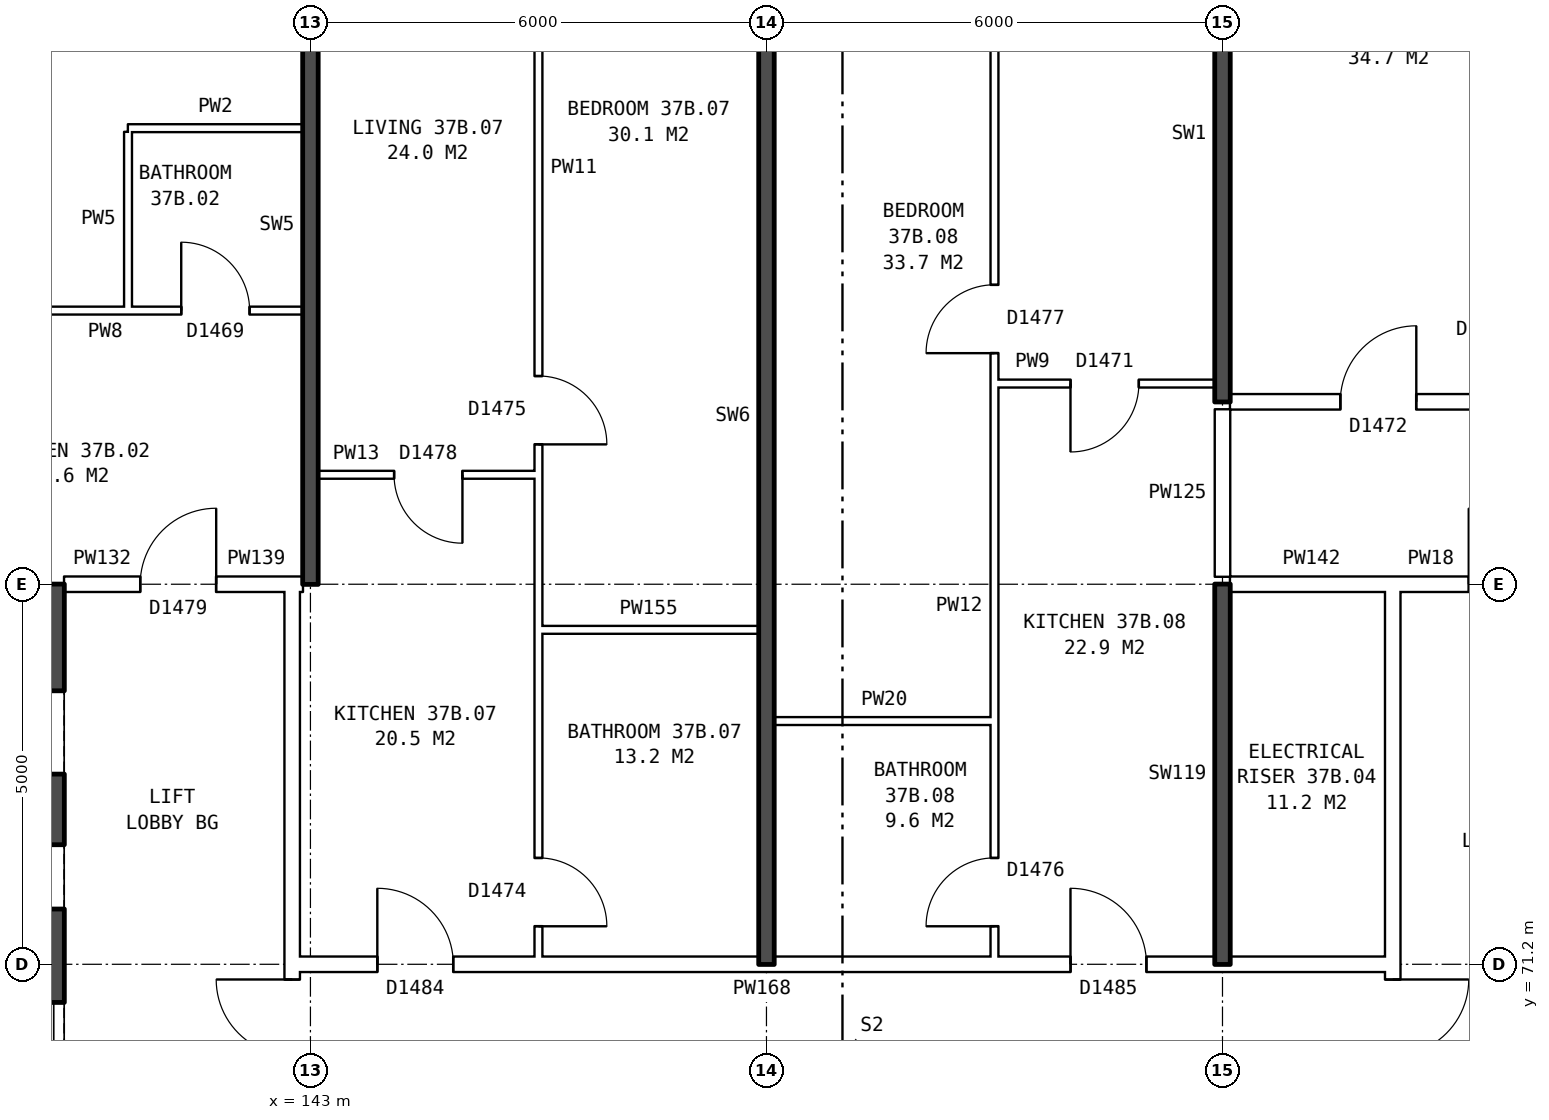
"""IFC4 building model, lengths in metres.
Left out: names, types, materials, properties, quantities, classifications, styles, units other than length and angle.
Written with IfcOpenShell. Run it as: python <this file> out.ifc"""

import sys

from ifc_helpers import new_model, si_unit, direction, frame, frame_2d, origin, place, context, subcontext, project, spatial, rectangle, extrude, element, fill, save


model = new_model("IFC4")
c1 = context("Model", 3, precision=1e-05, world=origin(), true_north=direction((0.0, 1.0)))
c2 = subcontext(c1, "Body", "Model", "MODEL_VIEW")
j1 = project(units=[si_unit("LENGTHUNIT", "METRE"), si_unit("PLANEANGLEUNIT", "RADIAN")], contexts=[c1])
p1 = place(None, origin())
s1 = spatial("IfcSite", under=j1, at=p1, CompositionType="ELEMENT")
p2 = place(p1, origin())
s2 = spatial("IfcBuilding", under=s1, at=p2, CompositionType="ELEMENT")
p3 = place(p2, frame((0.0, 0.0, 133.0)))
s3 = spatial("IfcBuildingStorey", under=s2, at=p3, CompositionType="ELEMENT", Elevation=133.0)
p4 = place(p3, frame((139.485, 63.8, 0.0), z_axis=(0.0, 0.0, 1.0), x_axis=(0.0, 1.0, 0.0)))
e1 = element("IfcWall", 1, at=p4, inside=s3, PredefinedType="SHEAR", context=c2, shape_type="SweptSolid", body=[
    extrude(rectangle(XDim=12.4, YDim=0.55, at=frame_2d((6.2, 0.0))), origin(), (0.0, 0.0, 1.0), 2.85),
])
p5 = place(p4, frame((1.325, 0.0, 0.0)))
e2 = element("IfcOpeningElement", 2, at=p5, cuts=e1, PredefinedType="OPENING", context=c2, shape_type="SweptSolid", body=[
    extrude(rectangle(XDim=1.1, YDim=2.1, at=frame_2d((0.55, 1.05))), frame((0.0, 0.285, 0.0), z_axis=(0.0, -1.0, 0.0), x_axis=(1.0, 0.0, 0.0)), (0.0, 0.0, 1.0), 0.57),
])
p6 = place(p4, frame((3.6, 0.0, 0.0)))
e3 = element("IfcOpeningElement", 3, at=p6, cuts=e1, PredefinedType="OPENING", context=c2, shape_type="SweptSolid", body=[
    extrude(rectangle(XDim=1.1, YDim=2.1, at=frame_2d((0.55, 1.05))), frame((0.0, 0.285, 0.0), z_axis=(0.0, -1.0, 0.0), x_axis=(1.0, 0.0, 0.0)), (0.0, 0.0, 1.0), 0.57),
])
p7 = place(p4, frame((5.8, 0.0, 0.0)))
e4 = element("IfcOpeningElement", 4, at=p7, cuts=e1, PredefinedType="OPENING", context=c2, shape_type="SweptSolid", body=[
    extrude(rectangle(XDim=1.1, YDim=2.1, at=frame_2d((0.55, 1.05))), frame((0.0, 0.285, 0.0), z_axis=(0.0, -1.0, 0.0), x_axis=(1.0, 0.0, 0.0)), (0.0, 0.0, 1.0), 0.57),
])
p8 = place(p4, frame((9.9, 0.0, 0.0)))
e5 = element("IfcOpeningElement", 5, at=p8, cuts=e1, PredefinedType="OPENING", context=c2, shape_type="SweptSolid", body=[
    extrude(rectangle(XDim=1.1, YDim=2.1, at=frame_2d((0.55, 1.05))), frame((0.0, 0.285, 0.0), z_axis=(0.0, -1.0, 0.0), x_axis=(1.0, 0.0, 0.0)), (0.0, 0.0, 1.0), 0.57),
])
p9 = place(p4, frame((8.125, 0.0, 0.0)))
e6 = element("IfcOpeningElement", 6, at=p9, cuts=e1, PredefinedType="OPENING", context=c2, shape_type="SweptSolid", body=[
    extrude(rectangle(XDim=0.85, YDim=2.1, at=frame_2d((0.425, 1.05))), frame((0.0, 0.285, 0.0), z_axis=(0.0, -1.0, 0.0), x_axis=(1.0, 0.0, 0.0)), (0.0, 0.0, 1.0), 0.57),
])
p10 = place(p3, frame((142.76, 63.9, 0.0), z_axis=(0.0, 0.0, 1.0), x_axis=(0.0, 1.0, 0.0)))
e7 = element("IfcWall", 7, at=p10, inside=s3, PredefinedType="PARTITIONING", context=c2, shape_type="SweptSolid", body=[
    extrude(rectangle(XDim=12.2, YDim=0.2, at=frame_2d((6.1, 0.0))), origin(), (0.0, 0.0, 1.0), 2.85),
])
p11 = place(p10, frame((5.1, 0.0, 0.0)))
e8 = element("IfcOpeningElement", 8, at=p11, cuts=e7, PredefinedType="OPENING", context=c2, shape_type="SweptSolid", body=[
    extrude(rectangle(XDim=2.0, YDim=2.1, at=frame_2d((1.0, 1.05))), frame((0.0, 0.11, 0.0), z_axis=(0.0, -1.0, 0.0), x_axis=(1.0, 0.0, 0.0)), (0.0, 0.0, 1.0), 0.22),
])
p12 = place(p3, frame((157.24, 63.9, 0.0), z_axis=(0.0, 0.0, 1.0), x_axis=(0.0, 1.0, 0.0)))
e9 = element("IfcWall", 9, at=p12, inside=s3, PredefinedType="PARTITIONING", context=c2, shape_type="SweptSolid", body=[
    extrude(rectangle(XDim=12.2, YDim=0.2, at=frame_2d((6.1, 0.0))), origin(), (0.0, 0.0, 1.0), 2.85),
])
p13 = place(p12, frame((5.1, 0.0, 0.0)))
e10 = element("IfcOpeningElement", 10, at=p13, cuts=e9, PredefinedType="OPENING", context=c2, shape_type="SweptSolid", body=[
    extrude(rectangle(XDim=2.0, YDim=2.1, at=frame_2d((1.0, 1.05))), frame((0.0, 0.11, 0.0), z_axis=(0.0, -1.0, 0.0), x_axis=(1.0, 0.0, 0.0)), (0.0, 0.0, 1.0), 0.22),
])
p14 = place(p3, frame((142.76, 71.2, 0.0), z_axis=(0.0, 0.0, 1.0), x_axis=(1.0, 0.0, 0.0)))
e11 = element("IfcWall", 11, at=p14, inside=s3, PredefinedType="PARTITIONING", context=c2, shape_type="SweptSolid", body=[
    extrude(rectangle(XDim=14.48, YDim=0.2, at=frame_2d((7.24, 0.0))), origin(), (0.0, 0.0, 1.0), 2.85),
])
p15 = place(p14, frame((1.12, 0.0, 0.0)))
e12 = element("IfcOpeningElement", 12, at=p15, cuts=e11, PredefinedType="OPENING", context=c2, shape_type="SweptSolid", body=[
    extrude(rectangle(XDim=1.0, YDim=2.1, at=frame_2d((0.5, 1.05))), frame((0.0, 0.11, 0.0), z_axis=(0.0, -1.0, 0.0), x_axis=(1.0, 0.0, 0.0)), (0.0, 0.0, 1.0), 0.22),
])
p16 = place(p14, frame((10.24, 0.0, 0.0)))
e13 = element("IfcOpeningElement", 13, at=p16, cuts=e11, PredefinedType="OPENING", context=c2, shape_type="SweptSolid", body=[
    extrude(rectangle(XDim=1.0, YDim=2.1, at=frame_2d((0.5, 1.05))), frame((0.0, 0.11, 0.0), z_axis=(0.0, -1.0, 0.0), x_axis=(1.0, 0.0, 0.0)), (0.0, 0.0, 1.0), 0.22),
])
for number, where, z_axis, x_axis in (
    (14, (149.1, 74.4, 0.0), (0.0, 0.0, 1.0), (1.0, 0.0, 0.0)),
    (15, (146.0, 75.6, 0.0), (0.0, 0.0, 1.0), (1.0, 0.0, 0.0)),
):
    element("IfcWall", number, at=place(p3, frame(where, z_axis=z_axis, x_axis=x_axis)), inside=s3, PredefinedType="PARTITIONING", context=c2, shape_type="SweptSolid", body=[
        extrude(rectangle(XDim=2.9, YDim=0.1, at=frame_2d((1.45, 0.0))), origin(), (0.0, 0.0, 1.0), 2.85),
    ])
p17 = place(p3, frame((139.76, 76.2, 0.0), z_axis=(0.0, 0.0, 1.0), x_axis=(1.0, 0.0, 0.0)))
e16 = element("IfcWall", 16, at=p17, inside=s3, PredefinedType="PARTITIONING", context=c2, shape_type="SweptSolid", body=[
    extrude(rectangle(XDim=3.0, YDim=0.2, at=frame_2d((1.5, 0.0))), origin(), (0.0, 0.0, 1.0), 2.85),
])
p18 = place(p17, frame((1.0, 0.0, 0.0)))
e17 = element("IfcOpeningElement", 17, at=p18, cuts=e16, PredefinedType="OPENING", context=c2, shape_type="SweptSolid", body=[
    extrude(rectangle(XDim=1.0, YDim=2.1, at=frame_2d((0.5, 1.05))), frame((0.0, 0.11, 0.0), z_axis=(0.0, -1.0, 0.0), x_axis=(1.0, 0.0, 0.0)), (0.0, 0.0, 1.0), 0.22),
])
p19 = place(p3, frame((142.76, 76.2, 0.0), z_axis=(0.0, 0.0, 1.0), x_axis=(1.0, 0.0, 0.0)))
e18 = element("IfcWall", 18, at=p19, inside=s3, PredefinedType="PARTITIONING", context=c2, shape_type="SweptSolid", body=[
    extrude(rectangle(XDim=0.14, YDim=0.2, at=frame_2d((0.07, 0.0))), origin(), (0.0, 0.0, 1.0), 2.85),
])
p20 = place(p3, frame((155.1, 76.2, 0.0), z_axis=(0.0, 0.0, 1.0), x_axis=(1.0, 0.0, 0.0)))
e19 = element("IfcWall", 19, at=p20, inside=s3, PredefinedType="PARTITIONING", context=c2, shape_type="SweptSolid", body=[
    extrude(rectangle(XDim=2.14, YDim=0.2, at=frame_2d((1.07, 0.0))), origin(), (0.0, 0.0, 1.0), 2.85),
])
p21 = place(p3, frame((157.24, 76.2, 0.0), z_axis=(0.0, 0.0, 1.0), x_axis=(1.0, 0.0, 0.0)))
e20 = element("IfcWall", 20, at=p21, inside=s3, PredefinedType="PARTITIONING", context=c2, shape_type="SweptSolid", body=[
    extrude(rectangle(XDim=3.0, YDim=0.2, at=frame_2d((1.5, 0.0))), origin(), (0.0, 0.0, 1.0), 2.85),
])
p22 = place(p21, frame((1.0, 0.0, 0.0)))
e21 = element("IfcOpeningElement", 21, at=p22, cuts=e20, PredefinedType="OPENING", context=c2, shape_type="SweptSolid", body=[
    extrude(rectangle(XDim=1.0, YDim=2.1, at=frame_2d((0.5, 1.05))), frame((0.0, 0.11, 0.0), z_axis=(0.0, -1.0, 0.0), x_axis=(1.0, 0.0, 0.0)), (0.0, 0.0, 1.0), 0.22),
])
p23 = place(p3, frame((143.1, 77.64, 0.0), z_axis=(0.0, 0.0, 1.0), x_axis=(1.0, 0.0, 0.0)))
e22 = element("IfcWall", 22, at=p23, inside=s3, PredefinedType="PARTITIONING", context=c2, shape_type="SweptSolid", body=[
    extrude(rectangle(XDim=2.9, YDim=0.1, at=frame_2d((1.45, 0.0))), origin(), (0.0, 0.0, 1.0), 2.85),
])
p24 = place(p23, frame((1.0, 0.0, 0.0)))
e23 = element("IfcOpeningElement", 23, at=p24, cuts=e22, PredefinedType="OPENING", context=c2, shape_type="SweptSolid", body=[
    extrude(rectangle(XDim=0.9, YDim=2.1, at=frame_2d((0.45, 1.05))), frame((0.0, 0.06, 0.0), z_axis=(0.0, -1.0, 0.0), x_axis=(1.0, 0.0, 0.0)), (0.0, 0.0, 1.0), 0.12),
])
p25 = place(p3, frame((155.1, 78.6, 0.0), z_axis=(0.0, 0.0, 1.0), x_axis=(1.0, 0.0, 0.0)))
e24 = element("IfcWall", 24, at=p25, inside=s3, PredefinedType="PARTITIONING", context=c2, shape_type="SweptSolid", body=[
    extrude(rectangle(XDim=17.29, YDim=0.2, at=frame_2d((8.645, 0.0))), origin(), (0.0, 0.0, 1.0), 2.85),
])
p26 = place(p25, frame((1.45, 0.0, 0.0)))
e25 = element("IfcOpeningElement", 25, at=p26, cuts=e24, PredefinedType="OPENING", context=c2, shape_type="SweptSolid", body=[
    extrude(rectangle(XDim=1.0, YDim=2.1, at=frame_2d((0.5, 1.05))), frame((0.0, 0.11, 0.0), z_axis=(0.0, -1.0, 0.0), x_axis=(1.0, 0.0, 0.0)), (0.0, 0.0, 1.0), 0.22),
])
p27 = place(p25, frame((8.4, 0.0, 0.0)))
e26 = element("IfcOpeningElement", 26, at=p27, cuts=e24, PredefinedType="OPENING", context=c2, shape_type="SweptSolid", body=[
    extrude(rectangle(XDim=1.0, YDim=2.1, at=frame_2d((0.5, 1.05))), frame((0.0, 0.11, 0.0), z_axis=(0.0, -1.0, 0.0), x_axis=(1.0, 0.0, 0.0)), (0.0, 0.0, 1.0), 0.22),
])
p28 = place(p3, frame((152.0, 78.84, 0.0), z_axis=(0.0, 0.0, 1.0), x_axis=(1.0, 0.0, 0.0)))
e27 = element("IfcWall", 27, at=p28, inside=s3, PredefinedType="PARTITIONING", context=c2, shape_type="SweptSolid", body=[
    extrude(rectangle(XDim=2.9, YDim=0.1, at=frame_2d((1.45, 0.0))), origin(), (0.0, 0.0, 1.0), 2.85),
])
p29 = place(p28, frame((1.0, 0.0, 0.0)))
e28 = element("IfcOpeningElement", 28, at=p29, cuts=e27, PredefinedType="OPENING", context=c2, shape_type="SweptSolid", body=[
    extrude(rectangle(XDim=0.9, YDim=2.1, at=frame_2d((0.45, 1.05))), frame((0.0, 0.06, 0.0), z_axis=(0.0, -1.0, 0.0), x_axis=(1.0, 0.0, 0.0)), (0.0, 0.0, 1.0), 0.12),
])
p30 = place(p3, frame((137.1, 79.8, 0.0), z_axis=(0.0, 0.0, 1.0), x_axis=(1.0, 0.0, 0.0)))
e29 = element("IfcWall", 29, at=p30, inside=s3, PredefinedType="PARTITIONING", context=c2, shape_type="SweptSolid", body=[
    extrude(rectangle(XDim=5.8, YDim=0.1, at=frame_2d((2.9, 0.0))), origin(), (0.0, 0.0, 1.0), 2.85),
])
p31 = place(p30, frame((1.3, 0.0, 0.0)))
e30 = element("IfcOpeningElement", 30, at=p31, cuts=e29, PredefinedType="OPENING", context=c2, shape_type="SweptSolid", body=[
    extrude(rectangle(XDim=0.9, YDim=2.1, at=frame_2d((0.45, 1.05))), frame((0.0, 0.06, 0.0), z_axis=(0.0, -1.0, 0.0), x_axis=(1.0, 0.0, 0.0)), (0.0, 0.0, 1.0), 0.12),
])
p32 = place(p30, frame((4.2, 0.0, 0.0)))
e31 = element("IfcOpeningElement", 31, at=p32, cuts=e29, PredefinedType="OPENING", context=c2, shape_type="SweptSolid", body=[
    extrude(rectangle(XDim=0.9, YDim=2.1, at=frame_2d((0.45, 1.05))), frame((0.0, 0.06, 0.0), z_axis=(0.0, -1.0, 0.0), x_axis=(1.0, 0.0, 0.0)), (0.0, 0.0, 1.0), 0.12),
])
for number, where, z_axis, x_axis in (
    (32, (140.6, 82.2, 0.0), (0.0, 0.0, 1.0), (1.0, 0.0, 0.0)),
    (33, (140.6, 79.85, 0.0), (0.0, 0.0, 1.0), (0.0, 1.0, 0.0)),
):
    element("IfcWall", number, at=place(p3, frame(where, z_axis=z_axis, x_axis=x_axis)), inside=s3, PredefinedType="PARTITIONING", context=c2, shape_type="SweptSolid", body=[
        extrude(rectangle(XDim=2.3, YDim=0.1, at=frame_2d((1.15, 0.0))), origin(), (0.0, 0.0, 1.0), 2.85),
    ])
p33 = place(p3, frame((143.0, 76.2, 0.0), z_axis=(0.0, 0.0, 1.0), x_axis=(0.0, 1.0, 0.0)))
e34 = element("IfcWall", 34, at=p33, inside=s3, PredefinedType="SOLIDWALL", context=c2, shape_type="SweptSolid", body=[
    extrude(rectangle(XDim=9.44, YDim=0.2, at=frame_2d((4.72, 0.0))), origin(), (0.0, 0.0, 1.0), 2.85),
])
p34 = place(p3, frame((146.0, 71.3, 0.0), z_axis=(0.0, 0.0, 1.0), x_axis=(0.0, 1.0, 0.0)))
e35 = element("IfcWall", 35, at=p34, inside=s3, PredefinedType="PARTITIONING", context=c2, shape_type="SweptSolid", body=[
    extrude(rectangle(XDim=14.34, YDim=0.1, at=frame_2d((7.17, 0.0))), origin(), (0.0, 0.0, 1.0), 2.85),
])
p35 = place(p34, frame((6.74, 0.0, 0.0)))
e36 = element("IfcOpeningElement", 36, at=p35, cuts=e35, PredefinedType="OPENING", context=c2, shape_type="SweptSolid", body=[
    extrude(rectangle(XDim=0.9, YDim=2.1, at=frame_2d((0.45, 1.05))), frame((0.0, 0.06, 0.0), z_axis=(0.0, -1.0, 0.0), x_axis=(1.0, 0.0, 0.0)), (0.0, 0.0, 1.0), 0.12),
])
p36 = place(p34, frame((0.4, 0.0, 0.0)))
e37 = element("IfcOpeningElement", 37, at=p36, cuts=e35, PredefinedType="OPENING", context=c2, shape_type="SweptSolid", body=[
    extrude(rectangle(XDim=0.9, YDim=2.1, at=frame_2d((0.45, 1.05))), frame((0.0, 0.06, 0.0), z_axis=(0.0, -1.0, 0.0), x_axis=(1.0, 0.0, 0.0)), (0.0, 0.0, 1.0), 0.12),
])
p37 = place(p3, frame((149.0, 71.2, 0.0), z_axis=(0.0, 0.0, 1.0), x_axis=(0.0, 1.0, 0.0)))
e38 = element("IfcWall", 38, at=p37, inside=s3, PredefinedType="SOLIDWALL", context=c2, shape_type="SweptSolid", body=[
    extrude(rectangle(XDim=14.44, YDim=0.2, at=frame_2d((7.22, 0.0))), origin(), (0.0, 0.0, 1.0), 2.85),
])
p38 = place(p3, frame((152.0, 71.3, 0.0), z_axis=(0.0, 0.0, 1.0), x_axis=(0.0, 1.0, 0.0)))
e39 = element("IfcWall", 39, at=p38, inside=s3, PredefinedType="PARTITIONING", context=c2, shape_type="SweptSolid", body=[
    extrude(rectangle(XDim=14.34, YDim=0.1, at=frame_2d((7.17, 0.0))), origin(), (0.0, 0.0, 1.0), 2.85),
])
p39 = place(p38, frame((7.94, 0.0, 0.0)))
e40 = element("IfcOpeningElement", 40, at=p39, cuts=e39, PredefinedType="OPENING", context=c2, shape_type="SweptSolid", body=[
    extrude(rectangle(XDim=0.9, YDim=2.1, at=frame_2d((0.45, 1.05))), frame((0.0, 0.06, 0.0), z_axis=(0.0, -1.0, 0.0), x_axis=(1.0, 0.0, 0.0)), (0.0, 0.0, 1.0), 0.12),
])
p40 = place(p38, frame((0.4, 0.0, 0.0)))
e41 = element("IfcOpeningElement", 41, at=p40, cuts=e39, PredefinedType="OPENING", context=c2, shape_type="SweptSolid", body=[
    extrude(rectangle(XDim=0.9, YDim=2.1, at=frame_2d((0.45, 1.05))), frame((0.0, 0.06, 0.0), z_axis=(0.0, -1.0, 0.0), x_axis=(1.0, 0.0, 0.0)), (0.0, 0.0, 1.0), 0.12),
])
p41 = place(p3, frame((155.0, 71.2, 0.0), z_axis=(0.0, 0.0, 1.0), x_axis=(0.0, 1.0, 0.0)))
e42 = element("IfcWall", 42, at=p41, inside=s3, PredefinedType="SOLIDWALL", context=c2, shape_type="SweptSolid", body=[
    extrude(rectangle(XDim=5.0, YDim=0.2, at=frame_2d((2.5, 0.0))), origin(), (0.0, 0.0, 1.0), 2.85),
])
p42 = place(p3, frame((155.0, 76.3, 0.0), z_axis=(0.0, 0.0, 1.0), x_axis=(0.0, 1.0, 0.0)))
e43 = element("IfcWall", 43, at=p42, inside=s3, PredefinedType="PARTITIONING", context=c2, shape_type="SweptSolid", body=[
    extrude(rectangle(XDim=2.2, YDim=0.2, at=frame_2d((1.1, 0.0))), origin(), (0.0, 0.0, 1.0), 2.85),
])
p43 = place(p3, frame((155.0, 78.6, 0.0), z_axis=(0.0, 0.0, 1.0), x_axis=(0.0, 1.0, 0.0)))
e44 = element("IfcWall", 44, at=p43, inside=s3, PredefinedType="SOLIDWALL", context=c2, shape_type="SweptSolid", body=[
    extrude(rectangle(XDim=7.04, YDim=0.2, at=frame_2d((3.52, 0.0))), origin(), (0.0, 0.0, 1.0), 2.85),
])
p44 = place(p11, origin())
e45 = element("IfcDoor", 45, at=p44, inside=s3, OperationType="DOUBLE_DOOR_SINGLE_SWING", PredefinedType="DOOR", context=c2, shape_type="SweptSolid", body=[
    extrude(rectangle(XDim=2.0, YDim=2.1, at=frame_2d((1.0, 1.05))), frame((0.0, 0.025, 0.0), z_axis=(0.0, -1.0, 0.0), x_axis=(1.0, 0.0, 0.0)), (0.0, 0.0, 1.0), 0.05),
])
fill(e8, e45)
p45 = place(p13, frame((2.0, 0.0, 0.0), z_axis=(0.0, 0.0, 1.0), x_axis=(-1.0, 0.0, 0.0)))
e46 = element("IfcDoor", 46, at=p45, inside=s3, OperationType="DOUBLE_DOOR_SINGLE_SWING", PredefinedType="DOOR", context=c2, shape_type="SweptSolid", body=[
    extrude(rectangle(XDim=2.0, YDim=2.1, at=frame_2d((1.0, 1.05))), frame((0.0, 0.025, 0.0), z_axis=(0.0, -1.0, 0.0), x_axis=(1.0, 0.0, 0.0)), (0.0, 0.0, 1.0), 0.05),
])
fill(e10, e46)
p46 = place(p18, origin())
e47 = element("IfcDoor", 47, at=p46, inside=s3, OperationType="SINGLE_SWING_RIGHT", PredefinedType="DOOR", context=c2, shape_type="SweptSolid", body=[
    extrude(rectangle(XDim=1.0, YDim=2.1, at=frame_2d((0.5, 1.05))), frame((0.0, 0.025, 0.0), z_axis=(0.0, -1.0, 0.0), x_axis=(1.0, 0.0, 0.0)), (0.0, 0.0, 1.0), 0.05),
])
fill(e17, e47)
p47 = place(p32, origin())
e48 = element("IfcDoor", 48, at=p47, inside=s3, OperationType="SINGLE_SWING_LEFT", PredefinedType="DOOR", context=c2, shape_type="SweptSolid", body=[
    extrude(rectangle(XDim=0.9, YDim=2.1, at=frame_2d((0.45, 1.05))), frame((0.0, 0.025, 0.0), z_axis=(0.0, -1.0, 0.0), x_axis=(1.0, 0.0, 0.0)), (0.0, 0.0, 1.0), 0.05),
])
fill(e31, e48)
p48 = place(p35, frame((0.9, 0.0, 0.0), z_axis=(0.0, 0.0, 1.0), x_axis=(-1.0, 0.0, 0.0)))
e49 = element("IfcDoor", 49, at=p48, inside=s3, OperationType="SINGLE_SWING_RIGHT", PredefinedType="DOOR", context=c2, shape_type="SweptSolid", body=[
    extrude(rectangle(XDim=0.9, YDim=2.1, at=frame_2d((0.45, 1.05))), frame((0.0, 0.025, 0.0), z_axis=(0.0, -1.0, 0.0), x_axis=(1.0, 0.0, 0.0)), (0.0, 0.0, 1.0), 0.05),
])
fill(e36, e49)
p49 = place(p15, origin())
e50 = element("IfcDoor", 50, at=p49, inside=s3, OperationType="SINGLE_SWING_LEFT", PredefinedType="DOOR", context=c2, shape_type="SweptSolid", body=[
    extrude(rectangle(XDim=1.0, YDim=2.1, at=frame_2d((0.5, 1.05))), frame((0.0, 0.025, 0.0), z_axis=(0.0, -1.0, 0.0), x_axis=(1.0, 0.0, 0.0)), (0.0, 0.0, 1.0), 0.05),
])
fill(e12, e50)
p50 = place(p24, frame((0.9, 0.0, 0.0), z_axis=(0.0, 0.0, 1.0), x_axis=(-1.0, 0.0, 0.0)))
e51 = element("IfcDoor", 51, at=p50, inside=s3, OperationType="SINGLE_SWING_LEFT", PredefinedType="DOOR", context=c2, shape_type="SweptSolid", body=[
    extrude(rectangle(XDim=0.9, YDim=2.1, at=frame_2d((0.45, 1.05))), frame((0.0, 0.025, 0.0), z_axis=(0.0, -1.0, 0.0), x_axis=(1.0, 0.0, 0.0)), (0.0, 0.0, 1.0), 0.05),
])
fill(e23, e51)
p51 = place(p36, frame((0.9, 0.0, 0.0), z_axis=(0.0, 0.0, 1.0), x_axis=(-1.0, 0.0, 0.0)))
e52 = element("IfcDoor", 52, at=p51, inside=s3, OperationType="SINGLE_SWING_RIGHT", PredefinedType="DOOR", context=c2, shape_type="SweptSolid", body=[
    extrude(rectangle(XDim=0.9, YDim=2.1, at=frame_2d((0.45, 1.05))), frame((0.0, 0.025, 0.0), z_axis=(0.0, -1.0, 0.0), x_axis=(1.0, 0.0, 0.0)), (0.0, 0.0, 1.0), 0.05),
])
fill(e37, e52)
p52 = place(p39, origin())
e53 = element("IfcDoor", 53, at=p52, inside=s3, OperationType="SINGLE_SWING_LEFT", PredefinedType="DOOR", context=c2, shape_type="SweptSolid", body=[
    extrude(rectangle(XDim=0.9, YDim=2.1, at=frame_2d((0.45, 1.05))), frame((0.0, 0.025, 0.0), z_axis=(0.0, -1.0, 0.0), x_axis=(1.0, 0.0, 0.0)), (0.0, 0.0, 1.0), 0.05),
])
fill(e40, e53)
p53 = place(p16, origin())
e54 = element("IfcDoor", 54, at=p53, inside=s3, OperationType="SINGLE_SWING_LEFT", PredefinedType="DOOR", context=c2, shape_type="SweptSolid", body=[
    extrude(rectangle(XDim=1.0, YDim=2.1, at=frame_2d((0.5, 1.05))), frame((0.0, 0.025, 0.0), z_axis=(0.0, -1.0, 0.0), x_axis=(1.0, 0.0, 0.0)), (0.0, 0.0, 1.0), 0.05),
])
fill(e13, e54)
p54 = place(p29, frame((0.9, 0.0, 0.0), z_axis=(0.0, 0.0, 1.0), x_axis=(-1.0, 0.0, 0.0)))
e55 = element("IfcDoor", 55, at=p54, inside=s3, OperationType="SINGLE_SWING_RIGHT", PredefinedType="DOOR", context=c2, shape_type="SweptSolid", body=[
    extrude(rectangle(XDim=0.9, YDim=2.1, at=frame_2d((0.45, 1.05))), frame((0.0, 0.025, 0.0), z_axis=(0.0, -1.0, 0.0), x_axis=(1.0, 0.0, 0.0)), (0.0, 0.0, 1.0), 0.05),
])
fill(e28, e55)
p55 = place(p40, origin())
e56 = element("IfcDoor", 56, at=p55, inside=s3, OperationType="SINGLE_SWING_LEFT", PredefinedType="DOOR", context=c2, shape_type="SweptSolid", body=[
    extrude(rectangle(XDim=0.9, YDim=2.1, at=frame_2d((0.45, 1.05))), frame((0.0, 0.025, 0.0), z_axis=(0.0, -1.0, 0.0), x_axis=(1.0, 0.0, 0.0)), (0.0, 0.0, 1.0), 0.05),
])
fill(e41, e56)
p56 = place(p26, origin())
e57 = element("IfcDoor", 57, at=p56, inside=s3, OperationType="SINGLE_SWING_RIGHT", PredefinedType="DOOR", context=c2, shape_type="SweptSolid", body=[
    extrude(rectangle(XDim=1.0, YDim=2.1, at=frame_2d((0.5, 1.05))), frame((0.0, 0.025, 0.0), z_axis=(0.0, -1.0, 0.0), x_axis=(1.0, 0.0, 0.0)), (0.0, 0.0, 1.0), 0.05),
])
fill(e25, e57)
save(model, sys.argv[1])
